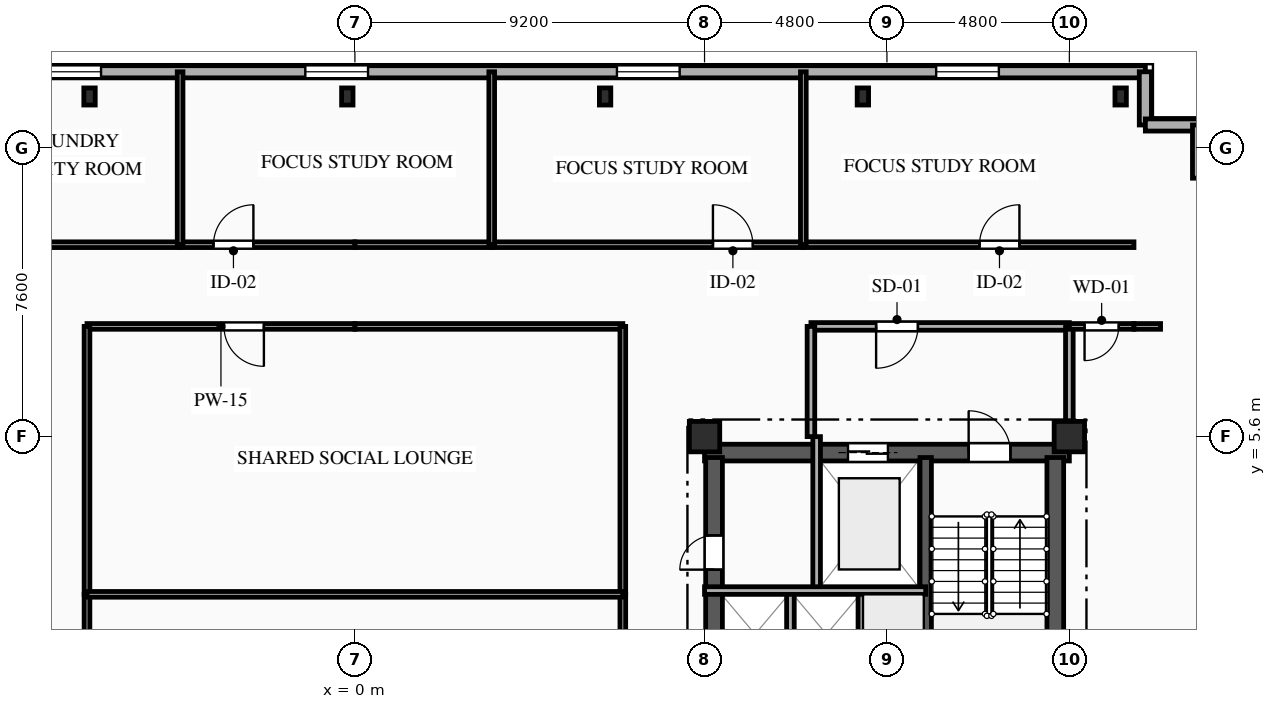
"""IFC4 building model, lengths in metres.
Left out: names, types, materials, properties, quantities, classifications, styles, units other than length and angle.
Written with IfcOpenShell. Run it as: python <this file> out.ifc"""

import sys

from ifc_helpers import new_model, si_unit, direction, frame, frame_2d, origin, origin_2d, place, context, subcontext, project, spatial, rectangle, i_section, extrude, element, fill, save


model = new_model("IFC4")
c1 = context("Model", 3, precision=1e-05, world=origin(), true_north=direction((0.0, 1.0)))
c2 = subcontext(c1, "Body", "Model", "MODEL_VIEW")
j1 = project(units=[si_unit("LENGTHUNIT", "METRE"), si_unit("PLANEANGLEUNIT", "RADIAN")], contexts=[c1])
p1 = place(None, origin())
s1 = spatial("IfcSite", under=j1, at=p1, CompositionType="ELEMENT")
p2 = place(p1, origin())
s2 = spatial("IfcBuilding", under=s1, at=p2, CompositionType="ELEMENT")
p3 = place(p2, frame((0.0, 0.0, 251.75)))
s3 = spatial("IfcBuildingStorey", under=s2, at=p3, CompositionType="ELEMENT", Elevation=251.75)
for number, where, z_axis, x_axis in (
    (1, (9.2, 5.6, 0.0), (0.0, 0.0, 1.0), (1.0, 0.0, 0.0)),
    (2, (18.8, 5.6, 0.0), (0.0, 0.0, 1.0), (1.0, 0.0, 0.0)),
):
    element("IfcColumn", number, at=place(p3, frame(where, z_axis=z_axis, x_axis=x_axis)), inside=s3, PredefinedType="COLUMN", context=c2, shape_type="SweptSolid", body=[
        extrude(rectangle(XDim=0.8, YDim=0.8, at=origin_2d()), origin(), (0.0, 0.0, 1.0), 3.35),
    ])
for number, where, z_axis, x_axis in (
    (3, (20.15, 14.55, 0.0), (0.0, 0.0, 1.0), (1.0, 0.0, 0.0)),
    (4, (13.367, 14.55, 0.0), (0.0, 0.0, 1.0), (1.0, 0.0, 0.0)),
    (5, (6.583, 14.55, 0.0), (0.0, 0.0, 1.0), (1.0, 0.0, 0.0)),
    (6, (-0.2, 14.55, 0.0), (0.0, 0.0, 1.0), (1.0, 0.0, 0.0)),
    (7, (-6.983, 14.55, 0.0), (0.0, 0.0, 1.0), (1.0, 0.0, 0.0)),
):
    element("IfcColumn", number, at=place(p3, frame(where, z_axis=z_axis, x_axis=x_axis)), inside=s3, PredefinedType="COLUMN", context=c2, shape_type="SweptSolid", body=[
        extrude(i_section(OverallWidth=0.3, OverallDepth=0.45, WebThickness=0.014, FlangeThickness=0.026, FilletRadius=0.027, at=origin_2d()), origin(), (0.0, 0.0, 1.0), 3.35),
    ])
p4 = place(p3, frame((-21.2, 15.2, 0.0), z_axis=(0.0, 0.0, 1.0), x_axis=(1.0, 0.0, 0.0)))
e8 = element("IfcWall", 8, at=p4, inside=s3, PredefinedType="SOLIDWALL", context=c2, shape_type="SweptSolid", body=[
    extrude(rectangle(XDim=42.0, YDim=0.32, at=frame_2d((21.0, 0.0))), origin(), (0.0, 0.0, 1.0), 3.04),
])
p5 = place(p4, frame((3.735, 0.0, 0.85)))
e9 = element("IfcOpeningElement", 9, at=p5, cuts=e8, PredefinedType="OPENING", context=c2, shape_type="SweptSolid", body=[
    extrude(rectangle(XDim=1.65, YDim=1.85, at=frame_2d((0.825, 0.925))), frame((0.0, 0.17, 0.0), z_axis=(0.0, -1.0, 0.0), x_axis=(1.0, 0.0, 0.0)), (0.0, 0.0, 1.0), 0.34),
])
p6 = place(p4, frame((12.92, 0.0, 0.85)))
e10 = element("IfcOpeningElement", 10, at=p6, cuts=e8, PredefinedType="OPENING", context=c2, shape_type="SweptSolid", body=[
    extrude(rectangle(XDim=1.6, YDim=1.85, at=frame_2d((0.8, 0.925))), frame((0.0, 0.17, 0.0), z_axis=(0.0, -1.0, 0.0), x_axis=(1.0, 0.0, 0.0)), (0.0, 0.0, 1.0), 0.34),
])
p7 = place(p4, frame((19.895, 0.0, 0.85)))
e11 = element("IfcOpeningElement", 11, at=p7, cuts=e8, PredefinedType="OPENING", context=c2, shape_type="SweptSolid", body=[
    extrude(rectangle(XDim=1.65, YDim=1.85, at=frame_2d((0.825, 0.925))), frame((0.0, 0.17, 0.0), z_axis=(0.0, -1.0, 0.0), x_axis=(1.0, 0.0, 0.0)), (0.0, 0.0, 1.0), 0.34),
])
p8 = place(p4, frame((28.095, 0.0, 0.85)))
e12 = element("IfcOpeningElement", 12, at=p8, cuts=e8, PredefinedType="OPENING", context=c2, shape_type="SweptSolid", body=[
    extrude(rectangle(XDim=1.65, YDim=1.85, at=frame_2d((0.825, 0.925))), frame((0.0, 0.17, 0.0), z_axis=(0.0, -1.0, 0.0), x_axis=(1.0, 0.0, 0.0)), (0.0, 0.0, 1.0), 0.34),
])
p9 = place(p4, frame((36.495, 0.0, 0.85)))
e13 = element("IfcOpeningElement", 13, at=p9, cuts=e8, PredefinedType="OPENING", context=c2, shape_type="SweptSolid", body=[
    extrude(rectangle(XDim=1.65, YDim=1.85, at=frame_2d((0.825, 0.925))), frame((0.0, 0.17, 0.0), z_axis=(0.0, -1.0, 0.0), x_axis=(1.0, 0.0, 0.0)), (0.0, 0.0, 1.0), 0.34),
])
for number, where, z_axis, x_axis in (
    (14, (20.8, 15.2, 0.0), (0.0, 0.0, 1.0), (0.0, -1.0, 0.0)),
    (15, (20.8, 13.8, 0.0), (0.0, 0.0, 1.0), (1.0, 0.0, 0.0)),
):
    element("IfcWall", number, at=place(p3, frame(where, z_axis=z_axis, x_axis=x_axis)), inside=s3, PredefinedType="SOLIDWALL", context=c2, shape_type="SweptSolid", body=[
        extrude(rectangle(XDim=1.4, YDim=0.32, at=frame_2d((0.7, 0.0))), origin(), (0.0, 0.0, 1.0), 3.04),
    ])
p10 = place(p3, frame((22.2, 13.8, 0.0), z_axis=(0.0, 0.0, 1.0), x_axis=(0.0, -1.0, 0.0)))
e16 = element("IfcWall", 16, at=p10, inside=s3, PredefinedType="SOLIDWALL", context=c2, shape_type="SweptSolid", body=[
    extrude(rectangle(XDim=1.4, YDim=0.32, at=frame_2d((0.7, 0.0))), origin(), (0.0, 0.0, 1.0), 3.04),
])
p11 = place(p3, frame((9.2, 5.18, 0.0), z_axis=(0.0, 0.0, 1.0), x_axis=(1.0, 0.0, 0.0)))
e17 = element("IfcWall", 17, at=p11, inside=s3, PredefinedType="SHEAR", context=c2, shape_type="SweptSolid", body=[
    extrude(rectangle(XDim=9.6, YDim=0.44, at=frame_2d((4.8, 0.0))), origin(), (0.0, 0.0, 1.0), 3.04),
])
p12 = place(p11, frame((6.95, 0.0, 0.0)))
e18 = element("IfcOpeningElement", 18, at=p12, cuts=e17, PredefinedType="OPENING", context=c2, shape_type="SweptSolid", body=[
    extrude(rectangle(XDim=1.1, YDim=2.15, at=frame_2d((0.55, 1.075))), frame((0.0, 0.23, 0.0), z_axis=(0.0, -1.0, 0.0), x_axis=(1.0, 0.0, 0.0)), (0.0, 0.0, 1.0), 0.46),
])
p13 = place(p11, frame((3.775, 0.0, 0.0)))
e19 = element("IfcOpeningElement", 19, at=p13, cuts=e17, PredefinedType="OPENING", context=c2, shape_type="SweptSolid", body=[
    extrude(rectangle(XDim=1.05, YDim=2.1, at=frame_2d((0.525, 1.05))), frame((0.0, 0.23, 0.0), z_axis=(0.0, -1.0, 0.0), x_axis=(1.0, 0.0, 0.0)), (0.0, 0.0, 1.0), 0.46),
])
p14 = place(p3, frame((9.45, -5.05, 0.0), z_axis=(0.0, 0.0, 1.0), x_axis=(0.0, 1.0, 0.0)))
e20 = element("IfcWall", 20, at=p14, inside=s3, PredefinedType="SHEAR", context=c2, shape_type="SweptSolid", body=[
    extrude(rectangle(XDim=10.1, YDim=0.44, at=frame_2d((5.05, 0.0))), origin(), (0.0, 0.0, 1.0), 3.04),
])
p15 = place(p14, frame((7.15, 0.0, 0.0)))
e21 = element("IfcOpeningElement", 21, at=p15, cuts=e20, PredefinedType="OPENING", context=c2, shape_type="SweptSolid", body=[
    extrude(rectangle(XDim=0.9, YDim=2.1, at=frame_2d((0.45, 1.05))), frame((0.0, 0.23, 0.0), z_axis=(0.0, -1.0, 0.0), x_axis=(1.0, 0.0, 0.0)), (0.0, 0.0, 1.0), 0.46),
])
p16 = place(p14, frame((2.4, 0.0, 0.0)))
e22 = element("IfcOpeningElement", 22, at=p16, cuts=e20, PredefinedType="OPENING", context=c2, shape_type="SweptSolid", body=[
    extrude(rectangle(XDim=1.2, YDim=2.15, at=frame_2d((0.6, 1.075))), frame((0.0, 0.23, 0.0), z_axis=(0.0, -1.0, 0.0), x_axis=(1.0, 0.0, 0.0)), (0.0, 0.0, 1.0), 0.46),
])
p17 = place(p14, frame((0.35, 0.0, 0.0)))
e23 = element("IfcOpeningElement", 23, at=p17, cuts=e20, PredefinedType="OPENING", context=c2, shape_type="SweptSolid", body=[
    extrude(rectangle(XDim=0.9, YDim=2.1, at=frame_2d((0.45, 1.05))), frame((0.0, 0.23, 0.0), z_axis=(0.0, -1.0, 0.0), x_axis=(1.0, 0.0, 0.0)), (0.0, 0.0, 1.0), 0.46),
])
p18 = place(p3, frame((18.43, -5.05, 0.0), z_axis=(0.0, 0.0, 1.0), x_axis=(0.0, 1.0, 0.0)))
e24 = element("IfcWall", 24, at=p18, inside=s3, PredefinedType="SHEAR", context=c2, shape_type="SweptSolid", body=[
    extrude(rectangle(XDim=10.1, YDim=0.44, at=frame_2d((5.05, 0.0))), origin(), (0.0, 0.0, 1.0), 3.04),
])
p19 = place(p3, frame((15.02, -5.05, 0.0), z_axis=(0.0, 0.0, 1.0), x_axis=(0.0, 1.0, 0.0)))
e25 = element("IfcWall", 25, at=p19, inside=s3, PredefinedType="SHEAR", context=c2, shape_type="SweptSolid", body=[
    extrude(rectangle(XDim=10.1, YDim=0.3, at=frame_2d((5.05, 0.0))), origin(), (0.0, 0.0, 1.0), 3.04),
])
p20 = place(p3, frame((12.15, 5.6, 0.0), z_axis=(0.0, 0.0, 1.0), x_axis=(0.0, -1.0, 0.0)))
e26 = element("IfcWall", 26, at=p20, inside=s3, PredefinedType="PARTITIONING", context=c2, shape_type="SweptSolid", body=[
    extrude(rectangle(XDim=4.05, YDim=0.2, at=frame_2d((2.025, 0.0))), origin(), (0.0, 0.0, 1.0), 3.04),
])
p21 = place(p3, frame((18.8, 8.5, 0.0), z_axis=(0.0, 0.0, 1.0), x_axis=(-1.0, 0.0, 0.0)))
e27 = element("IfcWall", 27, at=p21, inside=s3, PredefinedType="PARTITIONING", context=c2, shape_type="SweptSolid", body=[
    extrude(rectangle(XDim=6.8, YDim=0.2, at=frame_2d((3.4, 0.0))), origin(), (0.0, 0.0, 1.0), 3.04),
])
p22 = place(p21, frame((3.985, 0.0, 0.0)))
e28 = element("IfcOpeningElement", 28, at=p22, cuts=e27, PredefinedType="OPENING", context=c2, shape_type="SweptSolid", body=[
    extrude(rectangle(XDim=1.1, YDim=2.15, at=frame_2d((0.55, 1.075))), frame((0.0, 0.11, 0.0), z_axis=(0.0, -1.0, 0.0), x_axis=(1.0, 0.0, 0.0)), (0.0, 0.0, 1.0), 0.22),
])
p23 = place(p3, frame((12.0, 8.5, 0.0), z_axis=(0.0, 0.0, 1.0), x_axis=(0.0, -1.0, 0.0)))
e29 = element("IfcWall", 29, at=p23, inside=s3, PredefinedType="PARTITIONING", context=c2, shape_type="SweptSolid", body=[
    extrude(rectangle(XDim=2.9, YDim=0.2, at=frame_2d((1.45, 0.0))), origin(), (0.0, 0.0, 1.0), 3.04),
])
p24 = place(p3, frame((18.8, 5.6, 0.0), z_axis=(0.0, 0.0, 1.0), x_axis=(0.0, 1.0, 0.0)))
e30 = element("IfcWall", 30, at=p24, inside=s3, PredefinedType="PARTITIONING", context=c2, shape_type="SweptSolid", body=[
    extrude(rectangle(XDim=2.9, YDim=0.2, at=frame_2d((1.45, 0.0))), origin(), (0.0, 0.0, 1.0), 2.665),
])
for number, where, z_axis, x_axis in (
    (31, (11.46, -0.75, 0.0), (0.0, 0.0, 1.0), (0.0, 1.0, 0.0)),
    (32, (13.34, -0.75, 0.0), (0.0, 0.0, 1.0), (0.0, 1.0, 0.0)),
):
    element("IfcWall", number, at=place(p3, frame(where, z_axis=z_axis, x_axis=x_axis)), inside=s3, PredefinedType="PARTITIONING", context=c2, shape_type="SweptSolid", body=[
        extrude(rectangle(XDim=2.3, YDim=0.2, at=frame_2d((1.15, 0.0))), origin(), (0.0, 0.0, 1.0), 3.04),
    ])
p25 = place(p3, frame((-10.45, 10.65, 0.0), z_axis=(0.0, 0.0, 1.0), x_axis=(1.0, 0.0, 0.0)))
e33 = element("IfcWall", 33, at=p25, inside=s3, PredefinedType="PARTITIONING", context=c2, shape_type="SweptSolid", body=[
    extrude(rectangle(XDim=5.85, YDim=0.15, at=frame_2d((2.925, 0.0))), origin(), (0.0, 0.0, 1.0), 3.04),
])
p26 = place(p25, frame((1.048, 0.0, 0.0)))
e34 = element("IfcOpeningElement", 34, at=p26, cuts=e33, PredefinedType="OPENING", context=c2, shape_type="SweptSolid", body=[
    extrude(rectangle(XDim=0.95, YDim=2.1, at=frame_2d((0.475, 1.05))), frame((0.0, 0.085, 0.0), z_axis=(0.0, -1.0, 0.0), x_axis=(1.0, 0.0, 0.0)), (0.0, 0.0, 1.0), 0.17),
])
p27 = place(p3, frame((-4.6, 10.65, 0.0), z_axis=(0.0, 0.0, 1.0), x_axis=(1.0, 0.0, 0.0)))
e35 = element("IfcWall", 35, at=p27, inside=s3, PredefinedType="PARTITIONING", context=c2, shape_type="SweptSolid", body=[
    extrude(rectangle(XDim=4.6, YDim=0.15, at=frame_2d((2.3, 0.0))), origin(), (0.0, 0.0, 1.0), 3.04),
])
p28 = place(p27, frame((0.879, 0.0, 0.0)))
e36 = element("IfcOpeningElement", 36, at=p28, cuts=e35, PredefinedType="OPENING", context=c2, shape_type="SweptSolid", body=[
    extrude(rectangle(XDim=1.05, YDim=2.15, at=frame_2d((0.525, 1.075))), frame((0.0, 0.085, 0.0), z_axis=(0.0, -1.0, 0.0), x_axis=(1.0, 0.0, 0.0)), (0.0, 0.0, 1.0), 0.17),
])
p29 = place(p3, frame((0.0, 8.5, 0.0), z_axis=(0.0, 0.0, 1.0), x_axis=(-1.0, 0.0, 0.0)))
e37 = element("IfcWall", 37, at=p29, inside=s3, PredefinedType="PARTITIONING", context=c2, shape_type="SweptSolid", body=[
    extrude(rectangle(XDim=7.05, YDim=0.15, at=frame_2d((3.525, 0.0))), origin(), (0.0, 0.0, 1.0), 3.04),
])
p30 = place(p29, frame((2.395, 0.0, 0.0)))
e38 = element("IfcOpeningElement", 38, at=p30, cuts=e37, PredefinedType="OPENING", context=c2, shape_type="SweptSolid", body=[
    extrude(rectangle(XDim=1.05, YDim=2.15, at=frame_2d((0.525, 1.075))), frame((0.0, 0.085, 0.0), z_axis=(0.0, -1.0, 0.0), x_axis=(1.0, 0.0, 0.0)), (0.0, 0.0, 1.0), 0.17),
])
p31 = place(p3, frame((20.5, 8.5, 0.0), z_axis=(0.0, 0.0, 1.0), x_axis=(-1.0, 0.0, 0.0)))
e39 = element("IfcWall", 39, at=p31, inside=s3, PredefinedType="PARTITIONING", context=c2, shape_type="SweptSolid", body=[
    extrude(rectangle(XDim=1.7, YDim=0.15, at=frame_2d((0.85, 0.0))), origin(), (0.0, 0.0, 1.0), 3.04),
])
p32 = place(p31, frame((0.4, 0.0, 0.0)))
e40 = element("IfcOpeningElement", 40, at=p32, cuts=e39, PredefinedType="OPENING", context=c2, shape_type="SweptSolid", body=[
    extrude(rectangle(XDim=0.9, YDim=2.1, at=frame_2d((0.45, 1.05))), frame((0.0, 0.085, 0.0), z_axis=(0.0, -1.0, 0.0), x_axis=(1.0, 0.0, 0.0)), (0.0, 0.0, 1.0), 0.17),
])
p33 = place(p3, frame((21.2, 8.5, 0.0), z_axis=(0.0, 0.0, 1.0), x_axis=(-1.0, 0.0, 0.0)))
e41 = element("IfcWall", 41, at=p33, inside=s3, PredefinedType="PARTITIONING", context=c2, shape_type="SweptSolid", body=[
    extrude(rectangle(XDim=0.7, YDim=0.15, at=frame_2d((0.35, 0.0))), origin(), (0.0, 0.0, 1.0), 3.04),
])
p34 = place(p3, frame((0.0, 10.65, 0.0), z_axis=(0.0, 0.0, 1.0), x_axis=(1.0, 0.0, 0.0)))
e42 = element("IfcWall", 42, at=p34, inside=s3, PredefinedType="PARTITIONING", context=c2, shape_type="SweptSolid", body=[
    extrude(rectangle(XDim=3.6, YDim=0.15, at=frame_2d((1.8, 0.0))), origin(), (0.0, 0.0, 1.0), 3.04),
])
p35 = place(p3, frame((3.6, 10.65, 0.0), z_axis=(0.0, 0.0, 1.0), x_axis=(1.0, 0.0, 0.0)))
e43 = element("IfcWall", 43, at=p35, inside=s3, PredefinedType="PARTITIONING", context=c2, shape_type="SweptSolid", body=[
    extrude(rectangle(XDim=8.2, YDim=0.15, at=frame_2d((4.1, 0.0))), origin(), (0.0, 0.0, 1.0), 3.04),
])
p36 = place(p35, frame((5.821, 0.0, 0.0)))
e44 = element("IfcOpeningElement", 44, at=p36, cuts=e43, PredefinedType="OPENING", context=c2, shape_type="SweptSolid", body=[
    extrude(rectangle(XDim=1.05, YDim=2.15, at=frame_2d((0.525, 1.075))), frame((0.0, 0.085, 0.0), z_axis=(0.0, -1.0, 0.0), x_axis=(1.0, 0.0, 0.0)), (0.0, 0.0, 1.0), 0.17),
])
p37 = place(p3, frame((11.8, 10.65, 0.0), z_axis=(0.0, 0.0, 1.0), x_axis=(1.0, 0.0, 0.0)))
e45 = element("IfcWall", 45, at=p37, inside=s3, PredefinedType="PARTITIONING", context=c2, shape_type="SweptSolid", body=[
    extrude(rectangle(XDim=8.7, YDim=0.15, at=frame_2d((4.35, 0.0))), origin(), (0.0, 0.0, 1.0), 3.04),
])
p38 = place(p37, frame((4.636, 0.0, 0.0)))
e46 = element("IfcOpeningElement", 46, at=p38, cuts=e45, PredefinedType="OPENING", context=c2, shape_type="SweptSolid", body=[
    extrude(rectangle(XDim=1.05, YDim=2.15, at=frame_2d((0.525, 1.075))), frame((0.0, 0.085, 0.0), z_axis=(0.0, -1.0, 0.0), x_axis=(1.0, 0.0, 0.0)), (0.0, 0.0, 1.0), 0.17),
])
for number, where, z_axis, x_axis in (
    (47, (7.05, 8.5, 0.0), (0.0, 0.0, 1.0), (-1.0, 0.0, 0.0)),
    (48, (-7.05, 1.45, 0.0), (0.0, 0.0, 1.0), (0.0, -1.0, 0.0)),
    (49, (-7.05, 8.5, 0.0), (0.0, 0.0, 1.0), (0.0, -1.0, 0.0)),
    (50, (7.05, -5.6, 0.0), (0.0, 0.0, 1.0), (0.0, 1.0, 0.0)),
    (51, (7.05, 1.45, 0.0), (0.0, 0.0, 1.0), (0.0, 1.0, 0.0)),
):
    element("IfcWall", number, at=place(p3, frame(where, z_axis=z_axis, x_axis=x_axis)), inside=s3, PredefinedType="PARTITIONING", context=c2, shape_type="SweptSolid", body=[
        extrude(rectangle(XDim=7.05, YDim=0.15, at=frame_2d((3.525, 0.0))), origin(), (0.0, 0.0, 1.0), 3.04),
    ])
for number, where, z_axis, x_axis in (
    (52, (-4.6, 15.2, 0.0), (0.0, 0.0, 1.0), (0.0, -1.0, 0.0)),
    (53, (3.6, 15.2, 0.0), (0.0, 0.0, 1.0), (0.0, -1.0, 0.0)),
    (54, (11.8, 15.2, 0.0), (0.0, 0.0, 1.0), (0.0, -1.0, 0.0)),
):
    element("IfcWall", number, at=place(p3, frame(where, z_axis=z_axis, x_axis=x_axis)), inside=s3, PredefinedType="PARTITIONING", context=c2, shape_type="SweptSolid", body=[
        extrude(rectangle(XDim=4.55, YDim=0.15, at=frame_2d((2.275, 0.0))), origin(), (0.0, 0.0, 1.0), 3.04),
    ])
p39 = place(p3, frame((-7.05, 1.45, 0.0), z_axis=(0.0, 0.0, 1.0), x_axis=(1.0, 0.0, 0.0)))
e55 = element("IfcWall", 55, at=p39, inside=s3, PredefinedType="PARTITIONING", context=c2, shape_type="SweptSolid", body=[
    extrude(rectangle(XDim=14.1, YDim=0.15, at=frame_2d((7.05, 0.0))), origin(), (0.0, 0.0, 1.0), 3.04),
])
p40 = place(p3, frame((9.2, 1.55, 0.0), z_axis=(0.0, 0.0, 1.0), x_axis=(1.0, 0.0, 0.0)))
e56 = element("IfcWall", 56, at=p40, inside=s3, PredefinedType="PARTITIONING", context=c2, shape_type="SweptSolid", body=[
    extrude(rectangle(XDim=5.82, YDim=0.2, at=frame_2d((2.91, 0.0))), origin(), (0.0, 0.0, 1.0), 3.04),
])
p41 = place(p6, origin())
e57 = element("IfcWindow", 57, at=p41, inside=s3, PartitioningType="SINGLE_PANEL", PredefinedType="WINDOW", context=c2, shape_type="SweptSolid", body=[
    extrude(rectangle(XDim=1.6, YDim=1.85, at=frame_2d((0.8, 0.925))), frame((0.0, 0.03, 0.0), z_axis=(0.0, -1.0, 0.0), x_axis=(1.0, 0.0, 0.0)), (0.0, 0.0, 1.0), 0.06),
])
fill(e10, e57)
p42 = place(p7, origin())
e58 = element("IfcWindow", 58, at=p42, inside=s3, PartitioningType="SINGLE_PANEL", PredefinedType="WINDOW", context=c2, shape_type="SweptSolid", body=[
    extrude(rectangle(XDim=1.65, YDim=1.85, at=frame_2d((0.825, 0.925))), frame((0.0, 0.03, 0.0), z_axis=(0.0, -1.0, 0.0), x_axis=(1.0, 0.0, 0.0)), (0.0, 0.0, 1.0), 0.06),
])
fill(e11, e58)
p43 = place(p8, origin())
e59 = element("IfcWindow", 59, at=p43, inside=s3, PartitioningType="SINGLE_PANEL", PredefinedType="WINDOW", context=c2, shape_type="SweptSolid", body=[
    extrude(rectangle(XDim=1.65, YDim=1.85, at=frame_2d((0.825, 0.925))), frame((0.0, 0.03, 0.0), z_axis=(0.0, -1.0, 0.0), x_axis=(1.0, 0.0, 0.0)), (0.0, 0.0, 1.0), 0.06),
])
fill(e12, e59)
p44 = place(p9, origin())
e60 = element("IfcWindow", 60, at=p44, inside=s3, PartitioningType="SINGLE_PANEL", PredefinedType="WINDOW", context=c2, shape_type="SweptSolid", body=[
    extrude(rectangle(XDim=1.65, YDim=1.85, at=frame_2d((0.825, 0.925))), frame((0.0, 0.03, 0.0), z_axis=(0.0, -1.0, 0.0), x_axis=(1.0, 0.0, 0.0)), (0.0, 0.0, 1.0), 0.06),
])
fill(e13, e60)
p45 = place(p12, origin())
e61 = element("IfcDoor", 61, at=p45, inside=s3, OperationType="SINGLE_SWING_LEFT", PredefinedType="DOOR", context=c2, shape_type="SweptSolid", body=[
    extrude(rectangle(XDim=1.1, YDim=2.15, at=frame_2d((0.55, 1.075))), frame((0.0, 0.025, 0.0), z_axis=(0.0, -1.0, 0.0), x_axis=(1.0, 0.0, 0.0)), (0.0, 0.0, 1.0), 0.05),
])
fill(e18, e61)
p46 = place(p13, origin())
e62 = element("IfcDoor", 62, at=p46, inside=s3, OperationType="DOUBLE_DOOR_SLIDING", PredefinedType="DOOR", context=c2, shape_type="SweptSolid", body=[
    extrude(rectangle(XDim=1.05, YDim=2.1, at=frame_2d((0.525, 1.05))), frame((0.0, 0.025, 0.0), z_axis=(0.0, -1.0, 0.0), x_axis=(1.0, 0.0, 0.0)), (0.0, 0.0, 1.0), 0.05),
])
fill(e19, e62)
p47 = place(p22, origin())
e63 = element("IfcDoor", 63, at=p47, inside=s3, OperationType="SINGLE_SWING_RIGHT", PredefinedType="DOOR", context=c2, shape_type="SweptSolid", body=[
    extrude(rectangle(XDim=1.1, YDim=2.15, at=frame_2d((0.55, 1.075))), frame((0.0, 0.025, 0.0), z_axis=(0.0, -1.0, 0.0), x_axis=(1.0, 0.0, 0.0)), (0.0, 0.0, 1.0), 0.05),
])
fill(e28, e63)
p48 = place(p15, origin())
e64 = element("IfcDoor", 64, at=p48, inside=s3, OperationType="SINGLE_SWING_LEFT", PredefinedType="DOOR", context=c2, shape_type="SweptSolid", body=[
    extrude(rectangle(XDim=0.9, YDim=2.1, at=frame_2d((0.45, 1.05))), frame((0.0, 0.025, 0.0), z_axis=(0.0, -1.0, 0.0), x_axis=(1.0, 0.0, 0.0)), (0.0, 0.0, 1.0), 0.05),
])
fill(e21, e64)
p49 = place(p28, origin())
e65 = element("IfcDoor", 65, at=p49, inside=s3, OperationType="SINGLE_SWING_RIGHT", PredefinedType="DOOR", context=c2, shape_type="SweptSolid", body=[
    extrude(rectangle(XDim=1.05, YDim=2.15, at=frame_2d((0.525, 1.075))), frame((0.0, 0.025, 0.0), z_axis=(0.0, -1.0, 0.0), x_axis=(1.0, 0.0, 0.0)), (0.0, 0.0, 1.0), 0.05),
])
fill(e36, e65)
p50 = place(p30, origin())
e66 = element("IfcDoor", 66, at=p50, inside=s3, OperationType="SINGLE_SWING_LEFT", PredefinedType="DOOR", context=c2, shape_type="SweptSolid", body=[
    extrude(rectangle(XDim=1.05, YDim=2.15, at=frame_2d((0.525, 1.075))), frame((0.0, 0.025, 0.0), z_axis=(0.0, -1.0, 0.0), x_axis=(1.0, 0.0, 0.0)), (0.0, 0.0, 1.0), 0.05),
])
fill(e38, e66)
p51 = place(p32, origin())
e67 = element("IfcDoor", 67, at=p51, inside=s3, OperationType="SINGLE_SWING_RIGHT", PredefinedType="DOOR", context=c2, shape_type="SweptSolid", body=[
    extrude(rectangle(XDim=0.9, YDim=2.1, at=frame_2d((0.45, 1.05))), frame((0.0, 0.025, 0.0), z_axis=(0.0, -1.0, 0.0), x_axis=(1.0, 0.0, 0.0)), (0.0, 0.0, 1.0), 0.05),
])
fill(e40, e67)
p52 = place(p36, origin())
e68 = element("IfcDoor", 68, at=p52, inside=s3, OperationType="SINGLE_SWING_LEFT", PredefinedType="DOOR", context=c2, shape_type="SweptSolid", body=[
    extrude(rectangle(XDim=1.05, YDim=2.15, at=frame_2d((0.525, 1.075))), frame((0.0, 0.025, 0.0), z_axis=(0.0, -1.0, 0.0), x_axis=(1.0, 0.0, 0.0)), (0.0, 0.0, 1.0), 0.05),
])
fill(e44, e68)
p53 = place(p38, origin())
e69 = element("IfcDoor", 69, at=p53, inside=s3, OperationType="SINGLE_SWING_RIGHT", PredefinedType="DOOR", context=c2, shape_type="SweptSolid", body=[
    extrude(rectangle(XDim=1.05, YDim=2.15, at=frame_2d((0.525, 1.075))), frame((0.0, 0.025, 0.0), z_axis=(0.0, -1.0, 0.0), x_axis=(1.0, 0.0, 0.0)), (0.0, 0.0, 1.0), 0.05),
])
fill(e46, e69)
save(model, sys.argv[1])
